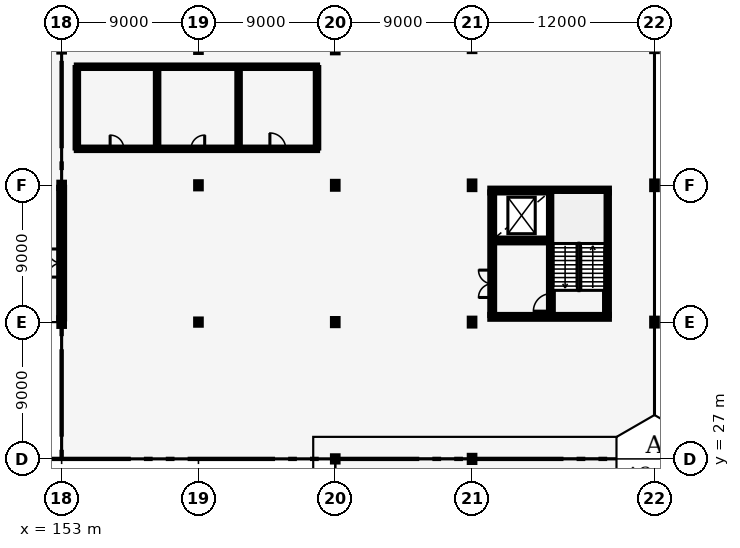
"""IFC4 building model, lengths in metres.
Left out: names, types, materials, properties, quantities, classifications, styles, units other than length and angle.
Written with IfcOpenShell. Run it as: python <this file> out.ifc"""

import sys

from ifc_helpers import new_model, si_unit, direction, frame, frame_2d, origin, origin_2d, place, context, subcontext, project, spatial, rectangle, i_section, extrude, element, fill, save


model = new_model("IFC4")
c1 = context("Model", 3, precision=1e-05, world=origin(), true_north=direction((0.0, 1.0)))
c2 = subcontext(c1, "Body", "Model", "MODEL_VIEW")
j1 = project(units=[si_unit("LENGTHUNIT", "METRE"), si_unit("PLANEANGLEUNIT", "RADIAN")], contexts=[c1])
p1 = place(None, origin())
s1 = spatial("IfcSite", under=j1, at=p1, CompositionType="ELEMENT")
p2 = place(p1, origin())
s2 = spatial("IfcBuilding", under=s1, at=p2, CompositionType="ELEMENT")
p3 = place(p2, frame((0.0, 0.0, 22.8)))
s3 = spatial("IfcBuildingStorey", under=s2, at=p3, CompositionType="ELEMENT", Elevation=22.8)
p4 = place(p3, frame((153.0, 36.0, 0.0), z_axis=(0.0, 0.0, 1.0), x_axis=(1.0, 0.0, 0.0)))
e1 = element("IfcColumn", 1, at=p4, inside=s3, PredefinedType="COLUMN", context=c2, shape_type="SweptSolid", body=[
    extrude(i_section(OverallWidth=0.3, OverallDepth=0.5, WebThickness=0.014, FlangeThickness=0.028, FilletRadius=0.027, at=origin_2d()), origin(), (0.0, 0.0, 1.0), 4.0),
])
for number, where, z_axis, x_axis in (
    (2, (153.0, 45.0, 0.0), (0.0, 0.0, 1.0), (1.0, 0.0, 0.0)),
    (3, (162.0, 36.0, 0.0), (0.0, 0.0, 1.0), (1.0, 0.0, 0.0)),
):
    element("IfcColumn", number, at=place(p3, frame(where, z_axis=z_axis, x_axis=x_axis)), inside=s3, PredefinedType="COLUMN", context=c2, shape_type="SweptSolid", body=[
        extrude(i_section(OverallWidth=0.3, OverallDepth=0.34, WebThickness=0.012, FlangeThickness=0.021, FilletRadius=0.027, at=origin_2d()), origin(), (0.0, 0.0, 1.0), 4.0),
    ])
p5 = place(p3, frame((162.0, 45.0, 0.0), z_axis=(0.0, 0.0, 1.0), x_axis=(1.0, 0.0, 0.0)))
e4 = element("IfcColumn", 4, at=p5, inside=s3, PredefinedType="COLUMN", context=c2, shape_type="SweptSolid", body=[
    extrude(i_section(OverallWidth=0.3, OverallDepth=0.4, WebThickness=0.013, FlangeThickness=0.024, FilletRadius=0.027, at=origin_2d()), origin(), (0.0, 0.0, 1.0), 4.0),
])
p6 = place(p3, frame((162.0, 54.0, 0.0), z_axis=(0.0, 0.0, 1.0), x_axis=(1.0, 0.0, 0.0)))
e5 = element("IfcColumn", 5, at=p6, inside=s3, PredefinedType="COLUMN", context=c2, shape_type="SweptSolid", body=[
    extrude(i_section(OverallWidth=0.3, OverallDepth=0.45, WebThickness=0.014, FlangeThickness=0.026, FilletRadius=0.027, at=origin_2d()), origin(), (0.0, 0.0, 1.0), 4.0),
])
p7 = place(p3, frame((171.0, 27.0, 0.0), z_axis=(0.0, 0.0, 1.0), x_axis=(1.0, 0.0, 0.0)))
e6 = element("IfcColumn", 6, at=p7, inside=s3, PredefinedType="COLUMN", context=c2, shape_type="SweptSolid", body=[
    extrude(i_section(OverallWidth=0.3, OverallDepth=0.34, WebThickness=0.012, FlangeThickness=0.021, FilletRadius=0.027, at=origin_2d()), origin(), (0.0, 0.0, 1.0), 4.0),
])
p8 = place(p3, frame((171.0, 36.0, 0.0), z_axis=(0.0, 0.0, 1.0), x_axis=(1.0, 0.0, 0.0)))
e7 = element("IfcColumn", 7, at=p8, inside=s3, PredefinedType="COLUMN", context=c2, shape_type="SweptSolid", body=[
    extrude(i_section(OverallWidth=0.3, OverallDepth=0.4, WebThickness=0.013, FlangeThickness=0.024, FilletRadius=0.027, at=origin_2d()), origin(), (0.0, 0.0, 1.0), 4.0),
])
p9 = place(p3, frame((171.0, 45.0, 0.0), z_axis=(0.0, 0.0, 1.0), x_axis=(1.0, 0.0, 0.0)))
e8 = element("IfcColumn", 8, at=p9, inside=s3, PredefinedType="COLUMN", context=c2, shape_type="SweptSolid", body=[
    extrude(i_section(OverallWidth=0.3, OverallDepth=0.45, WebThickness=0.014, FlangeThickness=0.026, FilletRadius=0.027, at=origin_2d()), origin(), (0.0, 0.0, 1.0), 4.0),
])
p10 = place(p3, frame((171.0, 54.0, 0.0), z_axis=(0.0, 0.0, 1.0), x_axis=(1.0, 0.0, 0.0)))
e9 = element("IfcColumn", 9, at=p10, inside=s3, PredefinedType="COLUMN", context=c2, shape_type="SweptSolid", body=[
    extrude(i_section(OverallWidth=0.3, OverallDepth=0.5, WebThickness=0.014, FlangeThickness=0.028, FilletRadius=0.027, at=origin_2d()), origin(), (0.0, 0.0, 1.0), 4.0),
])
p11 = place(p3, frame((180.0, 27.0, 0.0), z_axis=(0.0, 0.0, 1.0), x_axis=(1.0, 0.0, 0.0)))
e10 = element("IfcColumn", 10, at=p11, inside=s3, PredefinedType="COLUMN", context=c2, shape_type="SweptSolid", body=[
    extrude(i_section(OverallWidth=0.3, OverallDepth=0.4, WebThickness=0.013, FlangeThickness=0.024, FilletRadius=0.027, at=origin_2d()), origin(), (0.0, 0.0, 1.0), 4.0),
])
p12 = place(p3, frame((180.0, 36.0, 0.0), z_axis=(0.0, 0.0, 1.0), x_axis=(1.0, 0.0, 0.0)))
e11 = element("IfcColumn", 11, at=p12, inside=s3, PredefinedType="COLUMN", context=c2, shape_type="SweptSolid", body=[
    extrude(i_section(OverallWidth=0.3, OverallDepth=0.45, WebThickness=0.014, FlangeThickness=0.026, FilletRadius=0.027, at=origin_2d()), origin(), (0.0, 0.0, 1.0), 4.0),
])
p13 = place(p3, frame((180.0, 45.0, 0.0), z_axis=(0.0, 0.0, 1.0), x_axis=(1.0, 0.0, 0.0)))
e12 = element("IfcColumn", 12, at=p13, inside=s3, PredefinedType="COLUMN", context=c2, shape_type="SweptSolid", body=[
    extrude(i_section(OverallWidth=0.3, OverallDepth=0.5, WebThickness=0.014, FlangeThickness=0.028, FilletRadius=0.027, at=origin_2d()), origin(), (0.0, 0.0, 1.0), 4.0),
])
p14 = place(p3, frame((192.0, 27.0, 0.0), z_axis=(0.0, 0.0, 1.0), x_axis=(1.0, 0.0, 0.0)))
e13 = element("IfcColumn", 13, at=p14, inside=s3, PredefinedType="COLUMN", context=c2, shape_type="SweptSolid", body=[
    extrude(i_section(OverallWidth=0.3, OverallDepth=0.4, WebThickness=0.013, FlangeThickness=0.024, FilletRadius=0.027, at=origin_2d()), origin(), (0.0, 0.0, 1.0), 4.0),
])
p15 = place(p3, frame((192.0, 36.0, 0.0), z_axis=(0.0, 0.0, 1.0), x_axis=(1.0, 0.0, 0.0)))
e14 = element("IfcColumn", 14, at=p15, inside=s3, PredefinedType="COLUMN", context=c2, shape_type="SweptSolid", body=[
    extrude(i_section(OverallWidth=0.3, OverallDepth=0.45, WebThickness=0.014, FlangeThickness=0.026, FilletRadius=0.027, at=origin_2d()), origin(), (0.0, 0.0, 1.0), 4.0),
])
p16 = place(p3, frame((192.0, 45.0, 0.0), z_axis=(0.0, 0.0, 1.0), x_axis=(1.0, 0.0, 0.0)))
e15 = element("IfcColumn", 15, at=p16, inside=s3, PredefinedType="COLUMN", context=c2, shape_type="SweptSolid", body=[
    extrude(i_section(OverallWidth=0.3, OverallDepth=0.5, WebThickness=0.014, FlangeThickness=0.028, FilletRadius=0.027, at=origin_2d()), origin(), (0.0, 0.0, 1.0), 4.0),
])
p17 = place(p3, frame((153.0, 36.245, 0.0), z_axis=(0.0, 0.0, 1.0), x_axis=(0.0, 1.0, 0.0)))
e16 = element("IfcWall", 16, at=p17, inside=s3, PredefinedType="SOLIDWALL", context=c2, shape_type="SweptSolid", body=[
    extrude(rectangle(XDim=8.59, YDim=0.32, at=frame_2d((4.295, 0.0))), origin(), (0.0, 0.0, 1.0), 2.85),
])
p18 = place(p17, frame((2.715, 0.0, 0.0)))
e17 = element("IfcOpeningElement", 17, at=p18, cuts=e16, PredefinedType="OPENING", context=c2, shape_type="SweptSolid", body=[
    extrude(rectangle(XDim=1.85, YDim=2.3, at=frame_2d((0.925, 1.15))), frame((0.0, 0.17, 0.0), z_axis=(0.0, -1.0, 0.0), x_axis=(1.0, 0.0, 0.0)), (0.0, 0.0, 1.0), 0.34),
])
p19 = place(p17, frame((5.315, 0.0, 0.85)))
e18 = element("IfcOpeningElement", 18, at=p19, cuts=e16, PredefinedType="OPENING", context=c2, shape_type="SweptSolid", body=[
    extrude(rectangle(XDim=2.15, YDim=1.55, at=frame_2d((1.075, 0.775))), frame((0.0, 0.17, 0.0), z_axis=(0.0, -1.0, 0.0), x_axis=(1.0, 0.0, 0.0)), (0.0, 0.0, 1.0), 0.34),
])
p20 = place(p3, frame((181.325, 36.47, 0.0), z_axis=(0.0, 0.0, 1.0), x_axis=(0.0, 1.0, 0.0)))
e19 = element("IfcWall", 19, at=p20, inside=s3, PredefinedType="SHEAR", context=c2, shape_type="SweptSolid", body=[
    extrude(rectangle(XDim=8.06, YDim=0.25, at=frame_2d((4.03, 0.0))), origin(), (0.0, 0.0, 1.0), 3.64),
])
p21 = place(p20, frame((1.15, 0.0, 0.0)))
e20 = element("IfcOpeningElement", 20, at=p21, cuts=e19, PredefinedType="OPENING", context=c2, shape_type="SweptSolid", body=[
    extrude(rectangle(XDim=1.8, YDim=2.2, at=frame_2d((0.9, 1.1))), frame((0.0, 0.135, 0.0), z_axis=(0.0, -1.0, 0.0), x_axis=(1.0, 0.0, 0.0)), (0.0, 0.0, 1.0), 0.27),
])
p22 = place(p3, frame((188.875, 36.47, 0.0), z_axis=(0.0, 0.0, 1.0), x_axis=(0.0, 1.0, 0.0)))
e21 = element("IfcWall", 21, at=p22, inside=s3, PredefinedType="SHEAR", context=c2, shape_type="SweptSolid", body=[
    extrude(rectangle(XDim=8.06, YDim=0.25, at=frame_2d((4.03, 0.0))), origin(), (0.0, 0.0, 1.0), 3.64),
])
for number, where, z_axis, x_axis in (
    (22, (181.2, 36.345, 0.0), (0.0, 0.0, 1.0), (1.0, 0.0, 0.0)),
    (23, (181.2, 44.655, 0.0), (0.0, 0.0, 1.0), (1.0, 0.0, 0.0)),
):
    element("IfcWall", number, at=place(p3, frame(where, z_axis=z_axis, x_axis=x_axis)), inside=s3, PredefinedType="SHEAR", context=c2, shape_type="SweptSolid", body=[
        extrude(rectangle(XDim=7.8, YDim=0.25, at=frame_2d((3.9, 0.0))), origin(), (0.0, 0.0, 1.0), 3.64),
    ])
p23 = place(p3, frame((185.185, 36.47, 0.0), z_axis=(0.0, 0.0, 1.0), x_axis=(0.0, 1.0, 0.0)))
e24 = element("IfcWall", 24, at=p23, inside=s3, PredefinedType="SHEAR", context=c2, shape_type="SweptSolid", body=[
    extrude(rectangle(XDim=8.06, YDim=0.25, at=frame_2d((4.03, 0.0))), origin(), (0.0, 0.0, 1.0), 3.64),
])
p24 = place(p23, frame((0.25, 0.0, 0.0)))
e25 = element("IfcOpeningElement", 25, at=p24, cuts=e24, PredefinedType="OPENING", context=c2, shape_type="SweptSolid", body=[
    extrude(rectangle(XDim=1.15, YDim=2.15, at=frame_2d((0.575, 1.075))), frame((0.0, 0.135, 0.0), z_axis=(0.0, -1.0, 0.0), x_axis=(1.0, 0.0, 0.0)), (0.0, 0.0, 1.0), 0.27),
])
p25 = place(p3, frame((181.45, 41.37, 0.0), z_axis=(0.0, 0.0, 1.0), x_axis=(1.0, 0.0, 0.0)))
e26 = element("IfcWall", 26, at=p25, inside=s3, PredefinedType="SHEAR", context=c2, shape_type="SweptSolid", body=[
    extrude(rectangle(XDim=3.61, YDim=0.25, at=frame_2d((1.805, 0.0))), origin(), (0.0, 0.0, 1.0), 3.64),
])
p26 = place(p25, frame((0.95, 0.0, 0.0)))
e27 = element("IfcOpeningElement", 27, at=p26, cuts=e26, PredefinedType="OPENING", context=c2, shape_type="SweptSolid", body=[
    extrude(rectangle(XDim=1.2, YDim=2.2, at=frame_2d((0.6, 1.1))), frame((0.0, 0.135, 0.0), z_axis=(0.0, -1.0, 0.0), x_axis=(1.0, 0.0, 0.0)), (0.0, 0.0, 1.0), 0.27),
])
p27 = place(p3, frame((154.0, 47.4, 0.0), z_axis=(0.0, 0.0, 1.0), x_axis=(1.0, 0.0, 0.0)))
e28 = element("IfcWall", 28, at=p27, inside=s3, PredefinedType="PLUMBINGWALL", context=c2, shape_type="SweptSolid", body=[
    extrude(rectangle(XDim=15.8, YDim=0.16, at=frame_2d((7.9, 0.0))), origin(), (0.0, 0.0, 1.0), 2.8),
])
p28 = place(p27, frame((2.19, 0.0, 0.0)))
e29 = element("IfcOpeningElement", 29, at=p28, cuts=e28, PredefinedType="OPENING", context=c2, shape_type="SweptSolid", body=[
    extrude(rectangle(XDim=0.9, YDim=2.1, at=frame_2d((0.45, 1.05))), frame((0.0, 0.09, 0.0), z_axis=(0.0, -1.0, 0.0), x_axis=(1.0, 0.0, 0.0)), (0.0, 0.0, 1.0), 0.18),
])
p29 = place(p27, frame((7.51, 0.0, 0.0)))
e30 = element("IfcOpeningElement", 30, at=p29, cuts=e28, PredefinedType="OPENING", context=c2, shape_type="SweptSolid", body=[
    extrude(rectangle(XDim=0.9, YDim=2.1, at=frame_2d((0.45, 1.05))), frame((0.0, 0.09, 0.0), z_axis=(0.0, -1.0, 0.0), x_axis=(1.0, 0.0, 0.0)), (0.0, 0.0, 1.0), 0.18),
])
p30 = place(p27, frame((12.7, 0.0, 0.0)))
e31 = element("IfcOpeningElement", 31, at=p30, cuts=e28, PredefinedType="OPENING", context=c2, shape_type="SweptSolid", body=[
    extrude(rectangle(XDim=1.04, YDim=2.15, at=frame_2d((0.52, 1.075))), frame((0.0, 0.09, 0.0), z_axis=(0.0, -1.0, 0.0), x_axis=(1.0, 0.0, 0.0)), (0.0, 0.0, 1.0), 0.18),
])
p31 = place(p3, frame((154.0, 52.8, 0.0), z_axis=(0.0, 0.0, 1.0), x_axis=(1.0, 0.0, 0.0)))
e32 = element("IfcWall", 32, at=p31, inside=s3, PredefinedType="PLUMBINGWALL", context=c2, shape_type="SweptSolid", body=[
    extrude(rectangle(XDim=15.8, YDim=0.16, at=frame_2d((7.9, 0.0))), origin(), (0.0, 0.0, 1.0), 2.8),
])
for number, where, z_axis, x_axis in (
    (33, (154.0, 47.488, 0.0), (0.0, 0.0, 1.0), (0.0, 1.0, 0.0)),
    (34, (159.28, 47.488, 0.0), (0.0, 0.0, 1.0), (0.0, 1.0, 0.0)),
    (35, (164.64, 47.488, 0.0), (0.0, 0.0, 1.0), (0.0, 1.0, 0.0)),
    (36, (169.8, 47.488, 0.0), (0.0, 0.0, 1.0), (0.0, 1.0, 0.0)),
):
    element("IfcWall", number, at=place(p3, frame(where, z_axis=z_axis, x_axis=x_axis)), inside=s3, PredefinedType="PLUMBINGWALL", context=c2, shape_type="SweptSolid", body=[
        extrude(rectangle(XDim=5.224, YDim=0.16, at=frame_2d((2.612, 0.0))), origin(), (0.0, 0.0, 1.0), 2.8),
    ])
p32 = place(p18, origin())
e37 = element("IfcDoor", 37, at=p32, inside=s3, OperationType="DOUBLE_DOOR_SINGLE_SWING", PredefinedType="DOOR", context=c2, shape_type="SweptSolid", body=[
    extrude(rectangle(XDim=1.85, YDim=2.3, at=frame_2d((0.925, 1.15))), frame((0.0, 0.025, 0.0), z_axis=(0.0, -1.0, 0.0), x_axis=(1.0, 0.0, 0.0)), (0.0, 0.0, 1.0), 0.05),
])
fill(e17, e37)
p33 = place(p19, origin())
e38 = element("IfcWindow", 38, at=p33, inside=s3, PartitioningType="SINGLE_PANEL", PredefinedType="WINDOW", context=c2, shape_type="SweptSolid", body=[
    extrude(rectangle(XDim=2.15, YDim=1.55, at=frame_2d((1.075, 0.775))), frame((0.0, 0.03, 0.0), z_axis=(0.0, -1.0, 0.0), x_axis=(1.0, 0.0, 0.0)), (0.0, 0.0, 1.0), 0.06),
])
fill(e18, e38)
p34 = place(p24, origin())
e39 = element("IfcDoor", 39, at=p34, inside=s3, OperationType="SINGLE_SWING_LEFT", PredefinedType="DOOR", context=c2, shape_type="SweptSolid", body=[
    extrude(rectangle(XDim=1.15, YDim=2.15, at=frame_2d((0.575, 1.075))), frame((0.0, 0.025, 0.0), z_axis=(0.0, -1.0, 0.0), x_axis=(1.0, 0.0, 0.0)), (0.0, 0.0, 1.0), 0.05),
])
fill(e25, e39)
p35 = place(p26, origin())
e40 = element("IfcDoor", 40, at=p35, inside=s3, OperationType="DOUBLE_DOOR_SLIDING", PredefinedType="DOOR", context=c2, shape_type="SweptSolid", body=[
    extrude(rectangle(XDim=1.2, YDim=2.2, at=frame_2d((0.6, 1.1))), frame((0.0, 0.025, 0.0), z_axis=(0.0, -1.0, 0.0), x_axis=(1.0, 0.0, 0.0)), (0.0, 0.0, 1.0), 0.05),
])
fill(e27, e40)
p36 = place(p21, origin())
e41 = element("IfcDoor", 41, at=p36, inside=s3, OperationType="DOUBLE_DOOR_SINGLE_SWING", PredefinedType="DOOR", context=c2, shape_type="SweptSolid", body=[
    extrude(rectangle(XDim=1.8, YDim=2.2, at=frame_2d((0.9, 1.1))), frame((0.0, 0.025, 0.0), z_axis=(0.0, -1.0, 0.0), x_axis=(1.0, 0.0, 0.0)), (0.0, 0.0, 1.0), 0.05),
])
fill(e20, e41)
p37 = place(p28, origin())
e42 = element("IfcDoor", 42, at=p37, inside=s3, OperationType="SINGLE_SWING_LEFT", PredefinedType="DOOR", context=c2, shape_type="SweptSolid", body=[
    extrude(rectangle(XDim=0.9, YDim=2.1, at=frame_2d((0.45, 1.05))), frame((0.0, 0.025, 0.0), z_axis=(0.0, -1.0, 0.0), x_axis=(1.0, 0.0, 0.0)), (0.0, 0.0, 1.0), 0.05),
])
fill(e29, e42)
p38 = place(p29, origin())
e43 = element("IfcDoor", 43, at=p38, inside=s3, OperationType="SINGLE_SWING_RIGHT", PredefinedType="DOOR", context=c2, shape_type="SweptSolid", body=[
    extrude(rectangle(XDim=0.9, YDim=2.1, at=frame_2d((0.45, 1.05))), frame((0.0, 0.025, 0.0), z_axis=(0.0, -1.0, 0.0), x_axis=(1.0, 0.0, 0.0)), (0.0, 0.0, 1.0), 0.05),
])
fill(e30, e43)
p39 = place(p30, origin())
e44 = element("IfcDoor", 44, at=p39, inside=s3, OperationType="SINGLE_SWING_LEFT", PredefinedType="DOOR", context=c2, shape_type="SweptSolid", body=[
    extrude(rectangle(XDim=1.04, YDim=2.15, at=frame_2d((0.52, 1.075))), frame((0.0, 0.025, 0.0), z_axis=(0.0, -1.0, 0.0), x_axis=(1.0, 0.0, 0.0)), (0.0, 0.0, 1.0), 0.05),
])
fill(e31, e44)
save(model, sys.argv[1])
